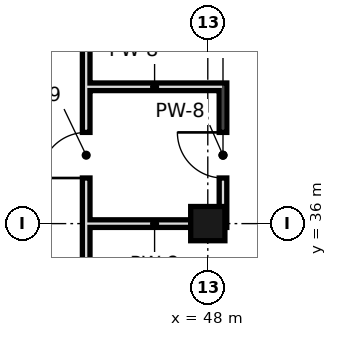
"""IFC4 building model, lengths in metres.
Left out: names, types, materials, properties, quantities, classifications, styles, units other than length and angle.
Written with IfcOpenShell. Run it as: python <this file> out.ifc"""

import sys

from ifc_helpers import new_model, si_unit, direction, frame, frame_2d, origin, origin_2d, place, context, subcontext, project, spatial, rectangle, hollow_rectangle, extrude, element, fill, save


model = new_model("IFC4")
c1 = context("Model", 3, precision=1e-05, world=origin(), true_north=direction((0.0, 1.0)))
c2 = subcontext(c1, "Body", "Model", "MODEL_VIEW")
j1 = project(units=[si_unit("LENGTHUNIT", "METRE"), si_unit("PLANEANGLEUNIT", "RADIAN")], contexts=[c1])
p1 = place(None, origin())
s1 = spatial("IfcSite", under=j1, at=p1, CompositionType="ELEMENT")
p2 = place(p1, origin())
s2 = spatial("IfcBuilding", under=s1, at=p2, CompositionType="ELEMENT")
p3 = place(p2, frame((0.0, 0.0, 44.4)))
s3 = spatial("IfcBuildingStorey", under=s2, at=p3, CompositionType="ELEMENT", Elevation=44.4)
p4 = place(p3, frame((48.0, 36.0, 0.0), z_axis=(0.0, 0.0, 1.0), x_axis=(1.0, 0.0, 0.0)))
e1 = element("IfcColumn", 1, at=p4, inside=s3, PredefinedType="COLUMN", context=c2, shape_type="SweptSolid", body=[
    extrude(hollow_rectangle(XDim=0.9, YDim=0.9, WallThickness=0.045, at=origin_2d()), origin(), (0.0, 0.0, 1.0), 5.4),
])
p5 = place(p3, frame((44.8, 18.9, 0.0), z_axis=(0.0, 0.0, 1.0), x_axis=(0.0, 1.0, 0.0)))
e2 = element("IfcWall", 2, at=p5, inside=s3, PredefinedType="SOLIDWALL", context=c2, shape_type="SweptSolid", body=[
    extrude(rectangle(XDim=29.7, YDim=0.2, at=frame_2d((14.85, 0.0))), origin(), (0.0, 0.0, 1.0), 4.52),
])
p6 = place(p5, frame((18.3, 0.0, 0.0)))
e3 = element("IfcOpeningElement", 3, at=p6, cuts=e2, PredefinedType="OPENING", context=c2, shape_type="SweptSolid", body=[
    extrude(rectangle(XDim=1.2, YDim=2.4, at=frame_2d((0.6, 1.2))), frame((0.0, 0.11, 0.0), z_axis=(0.0, -1.0, 0.0), x_axis=(1.0, 0.0, 0.0)), (0.0, 0.0, 1.0), 0.22),
])
p7 = place(p3, frame((48.4, 35.9, 0.0), z_axis=(0.0, 0.0, 1.0), x_axis=(0.0, 1.0, 0.0)))
e4 = element("IfcWall", 4, at=p7, inside=s3, PredefinedType="SOLIDWALL", context=c2, shape_type="SweptSolid", body=[
    extrude(rectangle(XDim=3.8, YDim=0.2, at=frame_2d((1.9, 0.0))), origin(), (0.0, 0.0, 1.0), 5.22),
])
p8 = place(p7, frame((1.3, 0.0, 0.0)))
e5 = element("IfcOpeningElement", 5, at=p8, cuts=e4, PredefinedType="OPENING", context=c2, shape_type="SweptSolid", body=[
    extrude(rectangle(XDim=1.2, YDim=2.4, at=frame_2d((0.6, 1.2))), frame((0.0, 0.11, 0.0), z_axis=(0.0, -1.0, 0.0), x_axis=(1.0, 0.0, 0.0)), (0.0, 0.0, 1.0), 0.22),
])
p9 = place(p3, frame((44.9, 36.0, 0.0), z_axis=(0.0, 0.0, 1.0), x_axis=(1.0, 0.0, 0.0)))
e6 = element("IfcWall", 6, at=p9, inside=s3, PredefinedType="SOLIDWALL", context=c2, shape_type="SweptSolid", body=[
    extrude(rectangle(XDim=3.4, YDim=0.2, at=frame_2d((1.7, 0.0))), origin(), (0.0, 0.0, 1.0), 5.22),
])
p10 = place(p3, frame((44.9, 39.6, 0.0), z_axis=(0.0, 0.0, 1.0), x_axis=(1.0, 0.0, 0.0)))
e7 = element("IfcWall", 7, at=p10, inside=s3, PredefinedType="SOLIDWALL", context=c2, shape_type="SweptSolid", body=[
    extrude(rectangle(XDim=3.4, YDim=0.2, at=frame_2d((1.7, 0.0))), origin(), (0.0, 0.0, 1.0), 4.77),
])
p11 = place(p8, frame((1.2, 0.0, 0.0), z_axis=(0.0, 0.0, 1.0), x_axis=(-1.0, 0.0, 0.0)))
e8 = element("IfcDoor", 8, at=p11, inside=s3, OperationType="SINGLE_SWING_LEFT", PredefinedType="DOOR", context=c2, shape_type="SweptSolid", body=[
    extrude(rectangle(XDim=1.2, YDim=2.4, at=frame_2d((0.6, 1.2))), frame((0.0, 0.025, 0.0), z_axis=(0.0, -1.0, 0.0), x_axis=(1.0, 0.0, 0.0)), (0.0, 0.0, 1.0), 0.05),
])
fill(e5, e8)
p12 = place(p6, origin())
e9 = element("IfcDoor", 9, at=p12, inside=s3, OperationType="SINGLE_SWING_LEFT", PredefinedType="DOOR", context=c2, shape_type="SweptSolid", body=[
    extrude(rectangle(XDim=1.2, YDim=2.4, at=frame_2d((0.6, 1.2))), frame((0.0, 0.025, 0.0), z_axis=(0.0, -1.0, 0.0), x_axis=(1.0, 0.0, 0.0)), (0.0, 0.0, 1.0), 0.05),
])
fill(e3, e9)
save(model, sys.argv[1])
